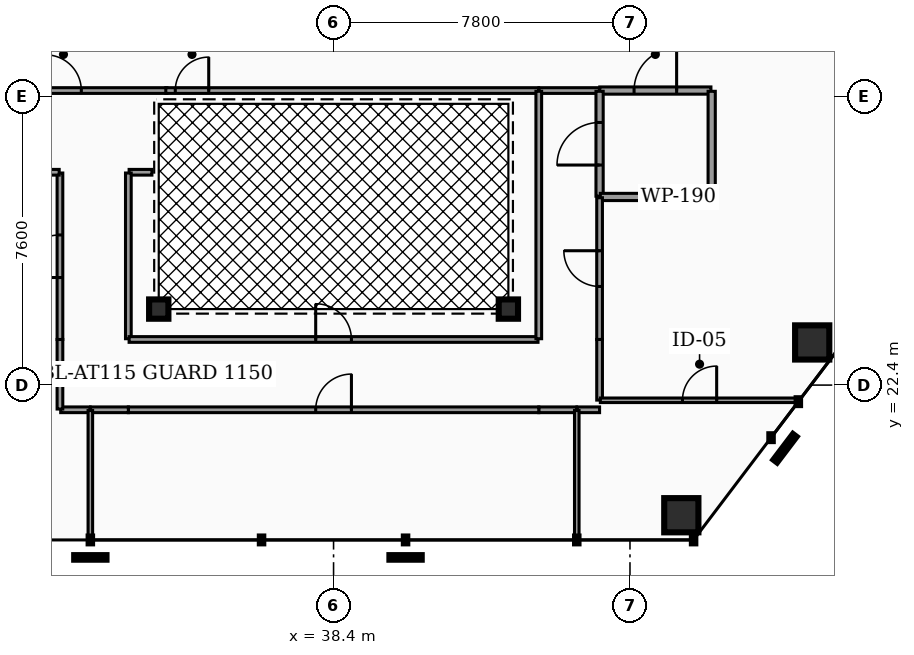
"""IFC4 building model, lengths in metres.
Left out: names, types, materials, properties, quantities, classifications, styles, units other than length and angle.
Written with IfcOpenShell. Run it as: python <this file> out.ifc"""

import sys

from ifc_helpers import new_model, si_unit, direction, frame, frame_2d, origin, origin_2d, place, context, subcontext, project, spatial, rectangle, hollow_rectangle, hollow_circle, extrude, element, fill, save


model = new_model("IFC4")
c1 = context("Model", 3, precision=1e-05, world=origin(), true_north=direction((0.0, 1.0)))
c2 = subcontext(c1, "Body", "Model", "MODEL_VIEW")
j1 = project(units=[si_unit("LENGTHUNIT", "METRE"), si_unit("PLANEANGLEUNIT", "RADIAN")], contexts=[c1])
p1 = place(None, origin())
s1 = spatial("IfcSite", under=j1, at=p1, CompositionType="ELEMENT")
p2 = place(p1, origin())
s2 = spatial("IfcBuilding", under=s1, at=p2, CompositionType="ELEMENT")
p3 = place(p2, frame((0.0, 0.0, 96.9)))
s3 = spatial("IfcBuildingStorey", under=s2, at=p3, CompositionType="ELEMENT", Elevation=96.9)
for number, where, z_axis, x_axis in (
    (1, (47.551, 18.976, 0.0), (0.0, 0.0, 1.0), (1.0, 0.0, 0.0)),
    (2, (50.995, 23.522, 0.0), (0.0, 0.0, 1.0), (1.0, 0.0, 0.0)),
):
    element("IfcColumn", number, at=place(p3, frame(where, z_axis=z_axis, x_axis=x_axis)), inside=s3, PredefinedType="COLUMN", context=c2, shape_type="SweptSolid", body=[
        extrude(hollow_rectangle(XDim=0.9, YDim=0.9, WallThickness=0.045, at=origin_2d()), origin(), (0.0, 0.0, 1.0), 3.82),
    ])
for number, where, z_axis, x_axis in (
    (3, (33.8, 24.4, 0.0), (0.0, 0.0, 1.0), (1.0, 0.0, 0.0)),
    (4, (43.0, 24.4, 0.0), (0.0, 0.0, 1.0), (1.0, 0.0, 0.0)),
):
    element("IfcColumn", number, at=place(p3, frame(where, z_axis=z_axis, x_axis=x_axis)), inside=s3, PredefinedType="COLUMN", context=c2, shape_type="SweptSolid", body=[
        extrude(hollow_circle(Radius=0.254, WallThickness=0.02, at=origin_2d()), origin(), (0.0, 0.0, 1.0), 3.82),
    ])
p4 = place(p3, frame((45.405, 30.15, 0.0), z_axis=(0.0, 0.0, 1.0), x_axis=(1.0, 0.0, 0.0)))
e5 = element("IfcWall", 5, at=p4, inside=s3, PredefinedType="PARTITIONING", context=c2, shape_type="SweptSolid", body=[
    extrude(rectangle(XDim=2.925, YDim=0.19, at=frame_2d((1.462, 0.0))), origin(), (0.0, 0.0, 1.0), 2.777),
])
p5 = place(p4, frame((0.903, 0.0, 0.0)))
e6 = element("IfcOpeningElement", 6, at=p5, cuts=e5, PredefinedType="OPENING", context=c2, shape_type="SweptSolid", body=[
    extrude(rectangle(XDim=1.12, YDim=2.05, at=frame_2d((0.56, 1.025))), frame((0.0, 0.105, 0.0), z_axis=(0.0, -1.0, 0.0), x_axis=(1.0, 0.0, 0.0)), (0.0, 0.0, 1.0), 0.21),
])
p6 = place(p3, frame((43.805, 30.15, 0.0), z_axis=(0.0, 0.0, 1.0), x_axis=(1.0, 0.0, 0.0)))
e7 = element("IfcWall", 7, at=p6, inside=s3, PredefinedType="PARTITIONING", context=c2, shape_type="SweptSolid", body=[
    extrude(rectangle(XDim=1.59, YDim=0.15, at=frame_2d((0.795, 0.0))), origin(), (0.0, 0.0, 1.0), 2.777),
])
p7 = place(p3, frame((28.57, 30.15, 0.0), z_axis=(0.0, 0.0, 1.0), x_axis=(1.0, 0.0, 0.0)))
e8 = element("IfcWall", 8, at=p7, inside=s3, PredefinedType="PARTITIONING", context=c2, shape_type="SweptSolid", body=[
    extrude(rectangle(XDim=5.445, YDim=0.15, at=frame_2d((2.722, 0.0))), origin(), (0.0, 0.0, 1.0), 2.777),
])
p8 = place(p7, frame((2.252, 0.0, 0.0)))
e9 = element("IfcOpeningElement", 9, at=p8, cuts=e8, PredefinedType="OPENING", context=c2, shape_type="SweptSolid", body=[
    extrude(rectangle(XDim=0.94, YDim=2.05, at=frame_2d((0.47, 1.025))), frame((0.0, 0.085, 0.0), z_axis=(0.0, -1.0, 0.0), x_axis=(1.0, 0.0, 0.0)), (0.0, 0.0, 1.0), 0.17),
])
p9 = place(p3, frame((33.985, 30.15, 0.0), z_axis=(0.0, 0.0, 1.0), x_axis=(1.0, 0.0, 0.0)))
e10 = element("IfcWall", 10, at=p9, inside=s3, PredefinedType="PARTITIONING", context=c2, shape_type="SweptSolid", body=[
    extrude(rectangle(XDim=9.81, YDim=0.15, at=frame_2d((4.905, 0.0))), origin(), (0.0, 0.0, 1.0), 2.777),
])
p10 = place(p9, frame((0.25, 0.0, 0.0)))
e11 = element("IfcOpeningElement", 11, at=p10, cuts=e10, PredefinedType="OPENING", context=c2, shape_type="SweptSolid", body=[
    extrude(rectangle(XDim=0.88, YDim=2.05, at=frame_2d((0.44, 1.025))), frame((0.0, 0.085, 0.0), z_axis=(0.0, -1.0, 0.0), x_axis=(1.0, 0.0, 0.0)), (0.0, 0.0, 1.0), 0.17),
])
p11 = place(p3, frame((45.4, 27.37, 0.0), z_axis=(0.0, 0.0, 1.0), x_axis=(0.0, 1.0, 0.0)))
e12 = element("IfcWall", 12, at=p11, inside=s3, PredefinedType="PARTITIONING", context=c2, shape_type="SweptSolid", body=[
    extrude(rectangle(XDim=2.76, YDim=0.19, at=frame_2d((1.38, 0.0))), origin(), (0.0, 0.0, 1.0), 2.777),
])
p12 = place(p11, frame((0.82, 0.0, 0.0)))
e13 = element("IfcOpeningElement", 13, at=p12, cuts=e12, PredefinedType="OPENING", context=c2, shape_type="SweptSolid", body=[
    extrude(rectangle(XDim=1.12, YDim=2.05, at=frame_2d((0.56, 1.025))), frame((0.0, 0.105, 0.0), z_axis=(0.0, -1.0, 0.0), x_axis=(1.0, 0.0, 0.0)), (0.0, 0.0, 1.0), 0.21),
])
p13 = place(p3, frame((45.42, 27.35, 0.0), z_axis=(0.0, 0.0, 1.0), x_axis=(1.0, 0.0, 0.0)))
e14 = element("IfcWall", 14, at=p13, inside=s3, PredefinedType="PARTITIONING", context=c2, shape_type="SweptSolid", body=[
    extrude(rectangle(XDim=2.91, YDim=0.19, at=frame_2d((1.455, 0.0))), origin(), (0.0, 0.0, 1.0), 2.777),
])
p14 = place(p3, frame((48.35, 27.37, 0.0), z_axis=(0.0, 0.0, 1.0), x_axis=(0.0, 1.0, 0.0)))
e15 = element("IfcWall", 15, at=p14, inside=s3, PredefinedType="PARTITIONING", context=c2, shape_type="SweptSolid", body=[
    extrude(rectangle(XDim=2.76, YDim=0.19, at=frame_2d((1.38, 0.0))), origin(), (0.0, 0.0, 1.0), 2.777),
])
p15 = place(p3, frame((43.8, 21.75, 0.0), z_axis=(0.0, 0.0, 1.0), x_axis=(1.0, 0.0, 0.0)))
e16 = element("IfcWall", 16, at=p15, inside=s3, PredefinedType="PARTITIONING", context=c2, shape_type="SweptSolid", body=[
    extrude(rectangle(XDim=0.995, YDim=0.15, at=frame_2d((0.498, 0.0))), origin(), (0.0, 0.0, 1.0), 2.777),
])
p16 = place(p3, frame((33.0, 21.75, 0.0), z_axis=(0.0, 0.0, 1.0), x_axis=(1.0, 0.0, 0.0)))
e17 = element("IfcWall", 17, at=p16, inside=s3, PredefinedType="PARTITIONING", context=c2, shape_type="SweptSolid", body=[
    extrude(rectangle(XDim=10.8, YDim=0.15, at=frame_2d((5.4, 0.0))), origin(), (0.0, 0.0, 1.0), 2.777),
])
p17 = place(p16, frame((4.93, 0.0, 0.0)))
e18 = element("IfcOpeningElement", 18, at=p17, cuts=e17, PredefinedType="OPENING", context=c2, shape_type="SweptSolid", body=[
    extrude(rectangle(XDim=0.94, YDim=2.05, at=frame_2d((0.47, 1.025))), frame((0.0, 0.085, 0.0), z_axis=(0.0, -1.0, 0.0), x_axis=(1.0, 0.0, 0.0)), (0.0, 0.0, 1.0), 0.17),
])
p18 = place(p3, frame((32.005, 21.75, 0.0), z_axis=(0.0, 0.0, 1.0), x_axis=(1.0, 0.0, 0.0)))
e19 = element("IfcWall", 19, at=p18, inside=s3, PredefinedType="PARTITIONING", context=c2, shape_type="SweptSolid", body=[
    extrude(rectangle(XDim=0.995, YDim=0.15, at=frame_2d((0.498, 0.0))), origin(), (0.0, 0.0, 1.0), 2.777),
])
p19 = place(p3, frame((44.805, 21.75, 0.0), z_axis=(0.0, 0.0, 1.0), x_axis=(1.0, 0.0, 0.0)))
e20 = element("IfcWall", 20, at=p19, inside=s3, PredefinedType="PARTITIONING", context=c2, shape_type="SweptSolid", body=[
    extrude(rectangle(XDim=0.595, YDim=0.15, at=frame_2d((0.297, 0.0))), origin(), (0.0, 0.0, 1.0), 2.777),
])
p20 = place(p3, frame((31.22, 21.75, 0.0), z_axis=(0.0, 0.0, 1.0), x_axis=(1.0, 0.0, 0.0)))
e21 = element("IfcWall", 21, at=p20, inside=s3, PredefinedType="PARTITIONING", context=c2, shape_type="SweptSolid", body=[
    extrude(rectangle(XDim=0.775, YDim=0.15, at=frame_2d((0.388, 0.0))), origin(), (0.0, 0.0, 1.0), 2.777),
])
p21 = place(p3, frame((31.2, 21.77, 0.0), z_axis=(0.0, 0.0, 1.0), x_axis=(0.0, 1.0, 0.0)))
e22 = element("IfcWall", 22, at=p21, inside=s3, PredefinedType="PARTITIONING", context=c2, shape_type="SweptSolid", body=[
    extrude(rectangle(XDim=1.83, YDim=0.15, at=frame_2d((0.915, 0.0))), origin(), (0.0, 0.0, 1.0), 2.777),
])
p22 = place(p3, frame((31.2, 23.6, 0.0), z_axis=(0.0, 0.0, 1.0), x_axis=(0.0, 1.0, 0.0)))
e23 = element("IfcWall", 23, at=p22, inside=s3, PredefinedType="PARTITIONING", context=c2, shape_type="SweptSolid", body=[
    extrude(rectangle(XDim=4.38, YDim=0.15, at=frame_2d((2.19, 0.0))), origin(), (0.0, 0.0, 1.0), 2.777),
])
p23 = place(p22, frame((1.63, 0.0, 0.0)))
e24 = element("IfcOpeningElement", 24, at=p23, cuts=e23, PredefinedType="OPENING", context=c2, shape_type="SweptSolid", body=[
    extrude(rectangle(XDim=1.12, YDim=2.05, at=frame_2d((0.56, 1.025))), frame((0.0, 0.085, 0.0), z_axis=(0.0, -1.0, 0.0), x_axis=(1.0, 0.0, 0.0)), (0.0, 0.0, 1.0), 0.17),
])
p24 = place(p3, frame((28.55, 28.0, 0.0), z_axis=(0.0, 0.0, 1.0), x_axis=(1.0, 0.0, 0.0)))
e25 = element("IfcWall", 25, at=p24, inside=s3, PredefinedType="PARTITIONING", context=c2, shape_type="SweptSolid", body=[
    extrude(rectangle(XDim=2.63, YDim=0.15, at=frame_2d((1.315, 0.0))), origin(), (0.0, 0.0, 1.0), 2.777),
])
p25 = place(p3, frame((45.4, 23.6, 0.0), z_axis=(0.0, 0.0, 1.0), x_axis=(0.0, 1.0, 0.0)))
e26 = element("IfcWall", 26, at=p25, inside=s3, PredefinedType="PARTITIONING", context=c2, shape_type="SweptSolid", body=[
    extrude(rectangle(XDim=3.73, YDim=0.15, at=frame_2d((1.865, 0.0))), origin(), (0.0, 0.0, 1.0), 2.777),
])
p26 = place(p25, frame((1.395, 0.0, 0.0)))
e27 = element("IfcOpeningElement", 27, at=p26, cuts=e26, PredefinedType="OPENING", context=c2, shape_type="SweptSolid", body=[
    extrude(rectangle(XDim=0.94, YDim=2.05, at=frame_2d((0.47, 1.025))), frame((0.0, 0.085, 0.0), z_axis=(0.0, -1.0, 0.0), x_axis=(1.0, 0.0, 0.0)), (0.0, 0.0, 1.0), 0.17),
])
p27 = place(p3, frame((45.4, 22.005, 0.0), z_axis=(0.0, 0.0, 1.0), x_axis=(0.0, 1.0, 0.0)))
e28 = element("IfcWall", 28, at=p27, inside=s3, PredefinedType="PARTITIONING", context=c2, shape_type="SweptSolid", body=[
    extrude(rectangle(XDim=1.595, YDim=0.15, at=frame_2d((0.798, 0.0))), origin(), (0.0, 0.0, 1.0), 2.777),
])
p28 = place(p3, frame((33.02, 28.0, 0.0), z_axis=(0.0, 0.0, 1.0), x_axis=(1.0, 0.0, 0.0)))
e29 = element("IfcWall", 29, at=p28, inside=s3, PredefinedType="PARTITIONING", context=c2, shape_type="SweptSolid", body=[
    extrude(rectangle(XDim=0.6, YDim=0.15, at=frame_2d((0.3, 0.0))), origin(), (0.0, 0.0, 1.0), 2.777),
])
p29 = place(p3, frame((33.0, 23.62, 0.0), z_axis=(0.0, 0.0, 1.0), x_axis=(0.0, 1.0, 0.0)))
e30 = element("IfcWall", 30, at=p29, inside=s3, PredefinedType="PARTITIONING", context=c2, shape_type="SweptSolid", body=[
    extrude(rectangle(XDim=4.36, YDim=0.15, at=frame_2d((2.18, 0.0))), origin(), (0.0, 0.0, 1.0), 2.777),
])
p30 = place(p3, frame((33.02, 23.6, 0.0), z_axis=(0.0, 0.0, 1.0), x_axis=(1.0, 0.0, 0.0)))
e31 = element("IfcWall", 31, at=p30, inside=s3, PredefinedType="PARTITIONING", context=c2, shape_type="SweptSolid", body=[
    extrude(rectangle(XDim=10.76, YDim=0.15, at=frame_2d((5.38, 0.0))), origin(), (0.0, 0.0, 1.0), 2.777),
])
p31 = place(p30, frame((4.91, 0.0, 0.0)))
e32 = element("IfcOpeningElement", 32, at=p31, cuts=e31, PredefinedType="OPENING", context=c2, shape_type="SweptSolid", body=[
    extrude(rectangle(XDim=0.94, YDim=2.05, at=frame_2d((0.47, 1.025))), frame((0.0, 0.085, 0.0), z_axis=(0.0, -1.0, 0.0), x_axis=(1.0, 0.0, 0.0)), (0.0, 0.0, 1.0), 0.17),
])
p32 = place(p3, frame((43.8, 23.62, 0.0), z_axis=(0.0, 0.0, 1.0), x_axis=(0.0, 1.0, 0.0)))
e33 = element("IfcWall", 33, at=p32, inside=s3, PredefinedType="PARTITIONING", context=c2, shape_type="SweptSolid", body=[
    extrude(rectangle(XDim=6.51, YDim=0.15, at=frame_2d((3.255, 0.0))), origin(), (0.0, 0.0, 1.0), 2.777),
])
for number, where, z_axis, x_axis in (
    (34, (44.8, 18.341, 0.0), (0.0, 0.0, 1.0), (0.0, 1.0, 0.0)),
    (35, (32.0, 18.341, 0.0), (0.0, 0.0, 1.0), (0.0, 1.0, 0.0)),
):
    element("IfcWall", number, at=place(p3, frame(where, z_axis=z_axis, x_axis=x_axis)), inside=s3, PredefinedType="PARTITIONING", context=c2, shape_type="SweptSolid", body=[
        extrude(rectangle(XDim=3.389, YDim=0.12, at=frame_2d((1.695, 0.0))), origin(), (0.0, 0.0, 1.0), 2.777),
    ])
p33 = place(p3, frame((45.42, 22.0, 0.0), z_axis=(0.0, 0.0, 1.0), x_axis=(1.0, 0.0, 0.0)))
e36 = element("IfcWall", 36, at=p33, inside=s3, PredefinedType="PARTITIONING", context=c2, shape_type="SweptSolid", body=[
    extrude(rectangle(XDim=5.223, YDim=0.12, at=frame_2d((2.611, 0.0))), origin(), (0.0, 0.0, 1.0), 2.777),
])
p34 = place(p33, frame((2.161, 0.0, 0.0)))
e37 = element("IfcOpeningElement", 37, at=p34, cuts=e36, PredefinedType="OPENING", context=c2, shape_type="SweptSolid", body=[
    extrude(rectangle(XDim=0.9, YDim=2.05, at=frame_2d((0.45, 1.025))), frame((0.0, 0.07, 0.0), z_axis=(0.0, -1.0, 0.0), x_axis=(1.0, 0.0, 0.0)), (0.0, 0.0, 1.0), 0.14),
])
p35 = place(p5, origin())
e38 = element("IfcDoor", 38, at=p35, inside=s3, OperationType="SINGLE_SWING_RIGHT", PredefinedType="DOOR", context=c2, shape_type="SweptSolid", body=[
    extrude(rectangle(XDim=1.12, YDim=2.05, at=frame_2d((0.56, 1.025))), frame((0.0, 0.025, 0.0), z_axis=(0.0, -1.0, 0.0), x_axis=(1.0, 0.0, 0.0)), (0.0, 0.0, 1.0), 0.05),
])
fill(e6, e38)
p36 = place(p8, origin())
e39 = element("IfcDoor", 39, at=p36, inside=s3, OperationType="SINGLE_SWING_LEFT", PredefinedType="DOOR", context=c2, shape_type="SweptSolid", body=[
    extrude(rectangle(XDim=0.94, YDim=2.05, at=frame_2d((0.47, 1.025))), frame((0.0, 0.025, 0.0), z_axis=(0.0, -1.0, 0.0), x_axis=(1.0, 0.0, 0.0)), (0.0, 0.0, 1.0), 0.05),
])
fill(e9, e39)
p37 = place(p10, origin())
e40 = element("IfcDoor", 40, at=p37, inside=s3, OperationType="SINGLE_SWING_RIGHT", PredefinedType="DOOR", context=c2, shape_type="SweptSolid", body=[
    extrude(rectangle(XDim=0.88, YDim=2.05, at=frame_2d((0.44, 1.025))), frame((0.0, 0.025, 0.0), z_axis=(0.0, -1.0, 0.0), x_axis=(1.0, 0.0, 0.0)), (0.0, 0.0, 1.0), 0.05),
])
fill(e11, e40)
p38 = place(p12, origin())
e41 = element("IfcDoor", 41, at=p38, inside=s3, OperationType="SINGLE_SWING_LEFT", PredefinedType="DOOR", context=c2, shape_type="SweptSolid", body=[
    extrude(rectangle(XDim=1.12, YDim=2.05, at=frame_2d((0.56, 1.025))), frame((0.0, 0.025, 0.0), z_axis=(0.0, -1.0, 0.0), x_axis=(1.0, 0.0, 0.0)), (0.0, 0.0, 1.0), 0.05),
])
fill(e13, e41)
p39 = place(p17, origin())
e42 = element("IfcDoor", 42, at=p39, inside=s3, OperationType="SINGLE_SWING_RIGHT", PredefinedType="DOOR", context=c2, shape_type="SweptSolid", body=[
    extrude(rectangle(XDim=0.94, YDim=2.05, at=frame_2d((0.47, 1.025))), frame((0.0, 0.025, 0.0), z_axis=(0.0, -1.0, 0.0), x_axis=(1.0, 0.0, 0.0)), (0.0, 0.0, 1.0), 0.05),
])
fill(e18, e42)
p40 = place(p23, origin())
e43 = element("IfcDoor", 43, at=p40, inside=s3, OperationType="SINGLE_SWING_LEFT", PredefinedType="DOOR", context=c2, shape_type="SweptSolid", body=[
    extrude(rectangle(XDim=1.12, YDim=2.05, at=frame_2d((0.56, 1.025))), frame((0.0, 0.025, 0.0), z_axis=(0.0, -1.0, 0.0), x_axis=(1.0, 0.0, 0.0)), (0.0, 0.0, 1.0), 0.05),
])
fill(e24, e43)
p41 = place(p26, origin())
e44 = element("IfcDoor", 44, at=p41, inside=s3, OperationType="SINGLE_SWING_RIGHT", PredefinedType="DOOR", context=c2, shape_type="SweptSolid", body=[
    extrude(rectangle(XDim=0.94, YDim=2.05, at=frame_2d((0.47, 1.025))), frame((0.0, 0.025, 0.0), z_axis=(0.0, -1.0, 0.0), x_axis=(1.0, 0.0, 0.0)), (0.0, 0.0, 1.0), 0.05),
])
fill(e27, e44)
p42 = place(p31, origin())
e45 = element("IfcDoor", 45, at=p42, inside=s3, OperationType="SINGLE_SWING_LEFT", PredefinedType="DOOR", context=c2, shape_type="SweptSolid", body=[
    extrude(rectangle(XDim=0.94, YDim=2.05, at=frame_2d((0.47, 1.025))), frame((0.0, 0.025, 0.0), z_axis=(0.0, -1.0, 0.0), x_axis=(1.0, 0.0, 0.0)), (0.0, 0.0, 1.0), 0.05),
])
fill(e32, e45)
p43 = place(p34, origin())
e46 = element("IfcDoor", 46, at=p43, inside=s3, OperationType="SINGLE_SWING_RIGHT", PredefinedType="DOOR", context=c2, shape_type="SweptSolid", body=[
    extrude(rectangle(XDim=0.9, YDim=2.05, at=frame_2d((0.45, 1.025))), frame((0.0, 0.025, 0.0), z_axis=(0.0, -1.0, 0.0), x_axis=(1.0, 0.0, 0.0)), (0.0, 0.0, 1.0), 0.05),
])
fill(e37, e46)
save(model, sys.argv[1])
